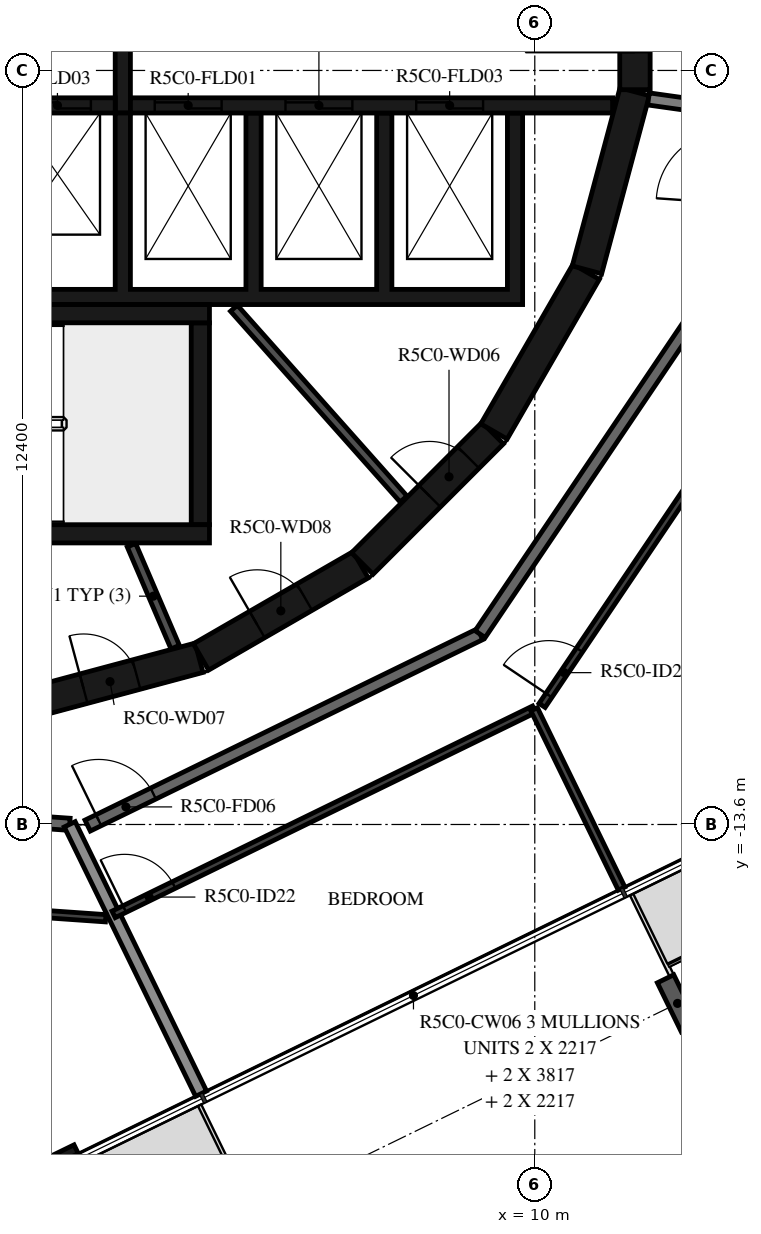
"""IFC4 building model, lengths in metres.
Left out: names, types, materials, properties, quantities, classifications, styles, units other than length and angle.
Written with IfcOpenShell. Run it as: python <this file> out.ifc"""

import sys

from ifc_helpers import new_model, si_unit, direction, frame, frame_2d, origin, origin_2d, place, context, subcontext, project, spatial, polyline, rectangle, i_section, outline, extrude, element, fill, save


model = new_model("IFC4")
c1 = context("Model", 3, precision=1e-05, world=origin(), true_north=direction((0.0, 1.0)))
c2 = subcontext(c1, "Body", "Model", "MODEL_VIEW")
j1 = project(units=[si_unit("LENGTHUNIT", "METRE"), si_unit("PLANEANGLEUNIT", "RADIAN")], contexts=[c1])
p1 = place(None, origin())
s1 = spatial("IfcSite", under=j1, at=p1, CompositionType="ELEMENT")
p2 = place(p1, origin())
s2 = spatial("IfcBuilding", under=s1, at=p2, CompositionType="ELEMENT")
p3 = place(p2, frame((0.0, 0.0, 209.4)))
s3 = spatial("IfcBuildingStorey", under=s2, at=p3, CompositionType="ELEMENT", Elevation=209.4)
p4 = place(p3, frame((12.348, -16.542, -0.38), z_axis=(0.0, 0.0, 1.0), x_axis=(-0.898794095235, -0.438371046456, 0.0)))
e1 = element("IfcColumn", 1, at=p4, inside=s3, PredefinedType="COLUMN", context=c2, shape_type="SweptSolid", body=[
    extrude(i_section(OverallWidth=0.3, OverallDepth=0.9, WebThickness=0.019, FlangeThickness=0.035, FilletRadius=0.03, at=origin_2d()), origin(), (0.0, 0.0, 1.0), 3.5),
])
p5 = place(p3, frame((-0.418, -20.343, 0.0), z_axis=(0.0, 0.0, 1.0), x_axis=(0.898778711213, 0.43840258698, 0.0)))
e2 = element("IfcWall", 2, at=p5, inside=s3, PredefinedType="STANDARD", context=c2, shape_type="SweptSolid", body=[
    extrude(rectangle(XDim=3.2, YDim=0.16, at=frame_2d((1.6, 0.0))), origin(), (0.0, 0.0, 1.0), 3.12),
])
p6 = place(p5, frame((0.4, 0.0, 0.0)))
e3 = element("IfcOpeningElement", 3, at=p6, cuts=e2, PredefinedType="OPENING", context=c2, shape_type="SweptSolid", body=[
    extrude(rectangle(XDim=2.4, YDim=2.4, at=frame_2d((1.2, 1.2))), frame((0.0, 0.09, 0.0), z_axis=(0.0, -1.0, 0.0), x_axis=(1.0, 0.0, 0.0)), (0.0, 0.0, 1.0), 0.18),
])
p7 = place(p3, frame((1.55, -11.643, 0.0), z_axis=(0.0, 0.0, 1.0), x_axis=(0.965948410781, 0.258734743916, 0.0)))
e4 = element("IfcWall", 4, at=p7, inside=s3, PredefinedType="SHEAR", context=c2, shape_type="SweptSolid", body=[
    extrude(rectangle(XDim=3.033, YDim=0.5, at=frame_2d((1.516, 0.0))), origin(), (0.0, 0.0, 1.0), 3.12),
])
p8 = place(p7, frame((1.066, 0.0, 0.0)))
e5 = element("IfcOpeningElement", 5, at=p8, cuts=e4, PredefinedType="OPENING", context=c2, shape_type="SweptSolid", body=[
    extrude(rectangle(XDim=0.9, YDim=2.1, at=frame_2d((0.45, 1.05))), frame((0.0, 0.26, 0.0), z_axis=(0.0, -1.0, 0.0), x_axis=(1.0, 0.0, 0.0)), (0.0, 0.0, 1.0), 0.52),
])
p9 = place(p3, frame((4.51, -10.845, 0.0), z_axis=(0.0, 0.0, 1.0), x_axis=(0.865975092491, 0.500087131594, 0.0)))
e6 = element("IfcWall", 6, at=p9, inside=s3, PredefinedType="SHEAR", context=c2, shape_type="SweptSolid", body=[
    extrude(rectangle(XDim=3.033, YDim=0.5, at=frame_2d((1.516, 0.0))), origin(), (0.0, 0.0, 1.0), 3.12),
])
p10 = place(p9, frame((1.066, 0.0, 0.0)))
e7 = element("IfcOpeningElement", 7, at=p10, cuts=e6, PredefinedType="OPENING", context=c2, shape_type="SweptSolid", body=[
    extrude(rectangle(XDim=0.9, YDim=2.1, at=frame_2d((0.45, 1.05))), frame((0.0, 0.26, 0.0), z_axis=(0.0, -1.0, 0.0), x_axis=(1.0, 0.0, 0.0)), (0.0, 0.0, 1.0), 0.52),
])
p11 = place(p3, frame((7.164, -9.308, 0.0), z_axis=(0.0, 0.0, 1.0), x_axis=(0.707106781187, 0.707106781187, 0.0)))
e8 = element("IfcWall", 8, at=p11, inside=s3, PredefinedType="SHEAR", context=c2, shape_type="SweptSolid", body=[
    extrude(rectangle(XDim=3.032, YDim=0.5, at=frame_2d((1.516, 0.0))), origin(), (0.0, 0.0, 1.0), 3.12),
])
p12 = place(p11, frame((1.566, 0.0, 0.0)))
e9 = element("IfcOpeningElement", 9, at=p12, cuts=e8, PredefinedType="OPENING", context=c2, shape_type="SweptSolid", body=[
    extrude(rectangle(XDim=0.9, YDim=2.1, at=frame_2d((0.45, 1.05))), frame((0.0, 0.26, 0.0), z_axis=(0.0, -1.0, 0.0), x_axis=(1.0, 0.0, 0.0)), (0.0, 0.0, 1.0), 0.52),
])
for number, where, z_axis, x_axis in (
    (10, (9.329, -7.137, 0.0), (0.0, 0.0, 1.0), (0.5, 0.866, 0.0)),
    (11, (10.858, -4.479, 0.0), (0.0, 0.0, 1.0), (0.259, 0.966, 0.0)),
):
    element("IfcWall", number, at=place(p3, frame(where, z_axis=z_axis, x_axis=x_axis)), inside=s3, PredefinedType="SHEAR", context=c2, shape_type="SweptSolid", body=[
        extrude(rectangle(XDim=3.033, YDim=0.5, at=frame_2d((1.516, 0.0))), origin(), (0.0, 0.0, 1.0), 3.12),
    ])
p13 = place(p3, frame((11.647, -1.516, 0.0), z_axis=(0.0, 0.0, 1.0), x_axis=(0.0, 1.0, 0.0)))
e12 = element("IfcWall", 12, at=p13, inside=s3, PredefinedType="SHEAR", context=c2, shape_type="SweptSolid", body=[
    extrude(rectangle(XDim=3.033, YDim=0.5, at=frame_2d((1.516, 0.0))), origin(), (0.0, 0.0, 1.0), 3.12),
])
p14 = place(p13, frame((0.616, 0.0, 0.0)))
e13 = element("IfcOpeningElement", 13, at=p14, cuts=e12, PredefinedType="OPENING", context=c2, shape_type="SweptSolid", body=[
    extrude(rectangle(XDim=1.8, YDim=2.1, at=frame_2d((0.9, 1.05))), frame((0.0, 0.26, 0.0), z_axis=(0.0, -1.0, 0.0), x_axis=(1.0, 0.0, 0.0)), (0.0, 0.0, 1.0), 0.52),
])
p15 = place(p3, frame((-2.4, -5.2, 0.0), z_axis=(0.0, 0.0, 1.0), x_axis=(1.0, 0.0, 0.0)))
e14 = element("IfcWall", 14, at=p15, inside=s3, PredefinedType="SHEAR", context=c2, shape_type="SweptSolid", body=[
    extrude(rectangle(XDim=7.05, YDim=0.3, at=frame_2d((3.525, 0.0))), origin(), (0.0, 0.0, 1.0), 3.12),
])
p16 = place(p3, frame((4.5, -8.67, 0.0), z_axis=(0.0, 0.0, 1.0), x_axis=(0.0, 1.0, 0.0)))
e15 = element("IfcWall", 15, at=p16, inside=s3, PredefinedType="SHEAR", context=c2, shape_type="SweptSolid", body=[
    extrude(rectangle(XDim=3.32, YDim=0.3, at=frame_2d((1.66, 0.0))), origin(), (0.0, 0.0, 1.0), 3.12),
])
p17 = place(p3, frame((0.1, -8.82, 0.0), z_axis=(0.0, 0.0, 1.0), x_axis=(1.0, 0.0, 0.0)))
e16 = element("IfcWall", 16, at=p17, inside=s3, PredefinedType="SHEAR", context=c2, shape_type="SweptSolid", body=[
    extrude(rectangle(XDim=4.55, YDim=0.3, at=frame_2d((2.275, 0.0))), origin(), (0.0, 0.0, 1.0), 3.12),
])
p18 = place(p3, origin())
e17 = element("IfcWall", 17, at=p18, inside=s3, PredefinedType="SHEAR", context=c2, shape_type="SweptSolid", body=[
    extrude(outline(polyline([(9.8, -5.05), (9.8, -4.8), (9.8, -1.9), (9.55, -1.9), (9.55, -4.8), (7.65, -4.8), (7.65, -1.9), (7.4, -1.9), (7.4, -4.8), (5.5, -4.8), (5.5, -1.9), (5.25, -1.9), (5.25, -4.8), (3.35, -4.8), (3.35, -1.9), (3.1, -1.9), (3.1, -4.8), (1.2, -4.8), (1.2, -1.9), (0.95, -1.9), (0.95, -4.8), (-5.25, -4.8), (-5.25, -1.9), (-5.5, -1.9), (-5.5, -4.8), (-7.4, -4.8), (-7.4, -1.9), (-7.65, -1.9), (-7.65, -4.8), (-9.55, -4.8), (-9.55, -1.9), (-9.8, -1.9), (-9.8, -4.8), (-9.8, -5.05), (9.8, -5.05)])), origin(), (0.0, 0.0, 1.0), 3.12),
])
p19 = place(p3, frame((-11.28, -1.775, 0.0), z_axis=(0.0, 0.0, 1.0), x_axis=(1.0, 0.0, 0.0)))
e18 = element("IfcWall", 18, at=p19, inside=s3, PredefinedType="SHEAR", context=c2, shape_type="SweptSolid", body=[
    extrude(rectangle(XDim=14.38, YDim=0.25, at=frame_2d((7.19, 0.0))), origin(), (0.0, 0.0, 1.0), 3.12),
])
p20 = place(p19, frame((12.88, 0.0, 0.0)))
e19 = element("IfcOpeningElement", 19, at=p20, cuts=e18, PredefinedType="OPENING", context=c2, shape_type="SweptSolid", body=[
    extrude(rectangle(XDim=1.1, YDim=2.1, at=frame_2d((0.55, 1.05))), frame((0.0, 0.135, 0.0), z_axis=(0.0, -1.0, 0.0), x_axis=(1.0, 0.0, 0.0)), (0.0, 0.0, 1.0), 0.27),
])
p21 = place(p19, frame((8.68, 0.0, 0.0)))
e20 = element("IfcOpeningElement", 20, at=p21, cuts=e18, PredefinedType="OPENING", context=c2, shape_type="SweptSolid", body=[
    extrude(rectangle(XDim=0.9, YDim=2.1, at=frame_2d((0.45, 1.05))), frame((0.0, 0.135, 0.0), z_axis=(0.0, -1.0, 0.0), x_axis=(1.0, 0.0, 0.0)), (0.0, 0.0, 1.0), 0.27),
])
p22 = place(p3, frame((3.35, -1.775, 0.0), z_axis=(0.0, 0.0, 1.0), x_axis=(1.0, 0.0, 0.0)))
e21 = element("IfcWall", 21, at=p22, inside=s3, PredefinedType="SHEAR", context=c2, shape_type="SweptSolid", body=[
    extrude(rectangle(XDim=7.93, YDim=0.25, at=frame_2d((3.965, 0.0))), origin(), (0.0, 0.0, 1.0), 3.12),
])
p23 = place(p22, frame((0.4, 0.0, 0.0)))
e22 = element("IfcOpeningElement", 22, at=p23, cuts=e21, PredefinedType="OPENING", context=c2, shape_type="SweptSolid", body=[
    extrude(rectangle(XDim=1.1, YDim=2.4, at=frame_2d((0.55, 1.2))), frame((0.0, 0.135, 0.0), z_axis=(0.0, -1.0, 0.0), x_axis=(1.0, 0.0, 0.0)), (0.0, 0.0, 1.0), 0.27),
])
p24 = place(p22, frame((2.55, 0.0, 0.0)))
e23 = element("IfcOpeningElement", 23, at=p24, cuts=e21, PredefinedType="OPENING", context=c2, shape_type="SweptSolid", body=[
    extrude(rectangle(XDim=1.1, YDim=2.4, at=frame_2d((0.55, 1.2))), frame((0.0, 0.135, 0.0), z_axis=(0.0, -1.0, 0.0), x_axis=(1.0, 0.0, 0.0)), (0.0, 0.0, 1.0), 0.27),
])
p25 = place(p22, frame((4.7, 0.0, 0.0)))
e24 = element("IfcOpeningElement", 24, at=p25, cuts=e21, PredefinedType="OPENING", context=c2, shape_type="SweptSolid", body=[
    extrude(rectangle(XDim=1.1, YDim=2.4, at=frame_2d((0.55, 1.2))), frame((0.0, 0.135, 0.0), z_axis=(0.0, -1.0, 0.0), x_axis=(1.0, 0.0, 0.0)), (0.0, 0.0, 1.0), 0.27),
])
p26 = place(p3, frame((3.225, -1.9, 0.0), z_axis=(0.0, 0.0, 1.0), x_axis=(0.0, 1.0, 0.0)))
e25 = element("IfcWall", 25, at=p26, inside=s3, PredefinedType="SHEAR", context=c2, shape_type="SweptSolid", body=[
    extrude(rectangle(XDim=3.8, YDim=0.25, at=frame_2d((1.9, 0.0))), origin(), (0.0, 0.0, 1.0), 3.12),
])
p27 = place(p3, frame((7.842, -8.248, 0.0), z_axis=(0.0, 0.0, 1.0), x_axis=(-0.66446128181, 0.747322691329, 0.0)))
e26 = element("IfcWall", 26, at=p27, inside=s3, PredefinedType="PARTITIONING", context=c2, shape_type="SweptSolid", body=[
    extrude(rectangle(XDim=4.198, YDim=0.15, at=frame_2d((2.099, 0.0))), origin(), (0.0, 0.0, 1.0), 3.12),
])
p28 = place(p3, frame((3.367, -9.007, 0.0), z_axis=(0.0, 0.0, 1.0), x_axis=(0.394387482265, -0.918944238696, 0.0)))
e27 = element("IfcWall", 27, at=p28, inside=s3, PredefinedType="PARTITIONING", context=c2, shape_type="SweptSolid", body=[
    extrude(rectangle(XDim=1.825, YDim=0.15, at=frame_2d((0.913, 0.0))), origin(), (0.0, 0.0, 1.0), 3.12),
])
p29 = place(p3, frame((13.302, -1.869, 0.0), z_axis=(0.0, 0.0, 1.0), x_axis=(-0.990274397042, 0.13912806533, 0.0)))
e28 = element("IfcWall", 28, at=p29, inside=s3, PredefinedType="STANDARD", context=c2, shape_type="SweptSolid", body=[
    extrude(rectangle(XDim=1.446, YDim=0.2, at=frame_2d((0.723, 0.0))), origin(), (0.0, 0.0, 1.0), 3.12),
])
p30 = place(p3, frame((-4.517, -13.117, 0.0), z_axis=(0.0, 0.0, 1.0), x_axis=(0.997564669554, -0.069747616856, 0.0)))
e29 = element("IfcWall", 29, at=p30, inside=s3, PredefinedType="STANDARD", context=c2, shape_type="SweptSolid", body=[
    extrude(rectangle(XDim=6.885, YDim=0.2, at=frame_2d((3.443, 0.0))), origin(), (0.0, 0.0, 1.0), 3.12),
])
p31 = place(p30, frame((3.2, 0.0, 0.0)))
e30 = element("IfcOpeningElement", 30, at=p31, cuts=e29, PredefinedType="OPENING", context=c2, shape_type="SweptSolid", body=[
    extrude(rectangle(XDim=1.0, YDim=2.1, at=frame_2d((0.5, 1.05))), frame((0.0, 0.11, 0.0), z_axis=(0.0, -1.0, 0.0), x_axis=(1.0, 0.0, 0.0)), (0.0, 0.0, 1.0), 0.22),
])
p32 = place(p3, frame((2.647, -13.618, 0.0), z_axis=(0.0, 0.0, 1.0), x_axis=(0.898796543751, 0.438366026218, 0.0)))
e31 = element("IfcWall", 31, at=p32, inside=s3, PredefinedType="STANDARD", context=c2, shape_type="SweptSolid", body=[
    extrude(rectangle(XDim=7.181, YDim=0.2, at=frame_2d((3.591, 0.0))), origin(), (0.0, 0.0, 1.0), 3.12),
])
p33 = place(p32, frame((0.2, 0.0, 0.0)))
e32 = element("IfcOpeningElement", 32, at=p33, cuts=e31, PredefinedType="OPENING", context=c2, shape_type="SweptSolid", body=[
    extrude(rectangle(XDim=1.0, YDim=2.1, at=frame_2d((0.5, 1.05))), frame((0.0, 0.11, 0.0), z_axis=(0.0, -1.0, 0.0), x_axis=(1.0, 0.0, 0.0)), (0.0, 0.0, 1.0), 0.22),
])
p34 = place(p3, frame((9.101, -10.47, 0.0), z_axis=(0.0, 0.0, 1.0), x_axis=(0.559195469534, 0.829035841718, 0.0)))
e33 = element("IfcWall", 33, at=p34, inside=s3, PredefinedType="STANDARD", context=c2, shape_type="SweptSolid", body=[
    extrude(rectangle(XDim=7.181, YDim=0.2, at=frame_2d((3.591, 0.0))), origin(), (0.0, 0.0, 1.0), 3.12),
])
p35 = place(p3, frame((4.512, -18.027, 0.0), z_axis=(0.0, 0.0, 1.0), x_axis=(-0.438374835386, 0.898792247241, 0.0)))
e34 = element("IfcWall", 34, at=p35, inside=s3, PredefinedType="STANDARD", context=c2, shape_type="SweptSolid", body=[
    extrude(rectangle(XDim=4.929, YDim=0.2, at=frame_2d((2.464, 0.0))), origin(), (0.0, 0.0, 1.0), 2.73),
])
p36 = place(p3, frame((-4.309, -14.635, 0.0), z_axis=(0.0, 0.0, 1.0), x_axis=(0.997564788147, -0.069745920658, 0.0)))
e35 = element("IfcWall", 35, at=p36, inside=s3, PredefinedType="PARTITIONING", context=c2, shape_type="SweptSolid", body=[
    extrude(rectangle(XDim=7.271, YDim=0.12, at=frame_2d((3.635, 0.0))), origin(), (0.0, 0.0, 1.0), 3.12),
])
p37 = place(p36, frame((3.632, 0.0, 0.0)))
e36 = element("IfcOpeningElement", 36, at=p37, cuts=e35, PredefinedType="OPENING", context=c2, shape_type="SweptSolid", body=[
    extrude(rectangle(XDim=0.9, YDim=2.1, at=frame_2d((0.45, 1.05))), frame((0.0, 0.07, 0.0), z_axis=(0.0, -1.0, 0.0), x_axis=(1.0, 0.0, 0.0)), (0.0, 0.0, 1.0), 0.14),
])
p38 = place(p3, frame((3.074, -15.078, 0.0), z_axis=(0.0, 0.0, 1.0), x_axis=(0.898800770739, 0.438357359377, 0.0)))
e37 = element("IfcWall", 37, at=p38, inside=s3, PredefinedType="PARTITIONING", context=c2, shape_type="SweptSolid", body=[
    extrude(rectangle(XDim=7.694, YDim=0.12, at=frame_2d((3.847, 0.0))), origin(), (0.0, 0.0, 1.0), 3.12),
])
p39 = place(p38, frame((0.2, 0.0, 0.0)))
e38 = element("IfcOpeningElement", 38, at=p39, cuts=e37, PredefinedType="OPENING", context=c2, shape_type="SweptSolid", body=[
    extrude(rectangle(XDim=0.9, YDim=2.1, at=frame_2d((0.45, 1.05))), frame((0.0, 0.07, 0.0), z_axis=(0.0, -1.0, 0.0), x_axis=(1.0, 0.0, 0.0)), (0.0, 0.0, 1.0), 0.14),
])
p40 = place(p3, frame((10.12, -11.642, 0.0), z_axis=(0.0, 0.0, 1.0), x_axis=(0.559201404667, 0.829031838362, 0.0)))
e39 = element("IfcWall", 39, at=p40, inside=s3, PredefinedType="PARTITIONING", context=c2, shape_type="SweptSolid", body=[
    extrude(rectangle(XDim=7.709, YDim=0.12, at=frame_2d((3.854, 0.0))), origin(), (0.0, 0.0, 1.0), 3.12),
])
p41 = place(p40, frame((0.2, 0.0, 0.0)))
e40 = element("IfcOpeningElement", 40, at=p41, cuts=e39, PredefinedType="OPENING", context=c2, shape_type="SweptSolid", body=[
    extrude(rectangle(XDim=0.9, YDim=2.1, at=frame_2d((0.45, 1.05))), frame((0.0, 0.07, 0.0), z_axis=(0.0, -1.0, 0.0), x_axis=(1.0, 0.0, 0.0)), (0.0, 0.0, 1.0), 0.14),
])
p42 = place(p3, frame((11.427, -14.654, 0.0), z_axis=(0.0, 0.0, 1.0), x_axis=(-0.438410435857, 0.898774882677, 0.0)))
e41 = element("IfcWall", 41, at=p42, inside=s3, PredefinedType="PARTITIONING", context=c2, shape_type="SweptSolid", body=[
    extrude(rectangle(XDim=3.281, YDim=0.12, at=frame_2d((1.64, 0.0))), origin(), (0.0, 0.0, 1.0), 2.73),
])
p43 = place(p14, origin())
e42 = element("IfcDoor", 42, at=p43, inside=s3, OperationType="DOUBLE_DOOR_SINGLE_SWING", PredefinedType="DOOR", context=c2, shape_type="SweptSolid", body=[
    extrude(rectangle(XDim=1.8, YDim=2.1, at=frame_2d((0.9, 1.05))), frame((0.0, 0.025, 0.0), z_axis=(0.0, -1.0, 0.0), x_axis=(1.0, 0.0, 0.0)), (0.0, 0.0, 1.0), 0.05),
])
fill(e13, e42)
p44 = place(p20, origin())
e43 = element("IfcDoor", 43, at=p44, inside=s3, OperationType="DOUBLE_DOOR_SLIDING", PredefinedType="DOOR", context=c2, shape_type="SweptSolid", body=[
    extrude(rectangle(XDim=1.1, YDim=2.1, at=frame_2d((0.55, 1.05))), frame((0.0, 0.025, 0.0), z_axis=(0.0, -1.0, 0.0), x_axis=(1.0, 0.0, 0.0)), (0.0, 0.0, 1.0), 0.05),
])
fill(e19, e43)
p45 = place(p23, origin())
e44 = element("IfcDoor", 44, at=p45, inside=s3, OperationType="DOUBLE_DOOR_SLIDING", PredefinedType="DOOR", context=c2, shape_type="SweptSolid", body=[
    extrude(rectangle(XDim=1.1, YDim=2.4, at=frame_2d((0.55, 1.2))), frame((0.0, 0.025, 0.0), z_axis=(0.0, -1.0, 0.0), x_axis=(1.0, 0.0, 0.0)), (0.0, 0.0, 1.0), 0.05),
])
fill(e22, e44)
p46 = place(p24, origin())
e45 = element("IfcDoor", 45, at=p46, inside=s3, OperationType="DOUBLE_DOOR_SLIDING", PredefinedType="DOOR", context=c2, shape_type="SweptSolid", body=[
    extrude(rectangle(XDim=1.1, YDim=2.4, at=frame_2d((0.55, 1.2))), frame((0.0, 0.025, 0.0), z_axis=(0.0, -1.0, 0.0), x_axis=(1.0, 0.0, 0.0)), (0.0, 0.0, 1.0), 0.05),
])
fill(e23, e45)
p47 = place(p25, origin())
e46 = element("IfcDoor", 46, at=p47, inside=s3, OperationType="DOUBLE_DOOR_SLIDING", PredefinedType="DOOR", context=c2, shape_type="SweptSolid", body=[
    extrude(rectangle(XDim=1.1, YDim=2.4, at=frame_2d((0.55, 1.2))), frame((0.0, 0.025, 0.0), z_axis=(0.0, -1.0, 0.0), x_axis=(1.0, 0.0, 0.0)), (0.0, 0.0, 1.0), 0.05),
])
fill(e24, e46)
p48 = place(p12, origin())
e47 = element("IfcDoor", 47, at=p48, inside=s3, OperationType="SINGLE_SWING_RIGHT", PredefinedType="DOOR", context=c2, shape_type="SweptSolid", body=[
    extrude(rectangle(XDim=0.9, YDim=2.1, at=frame_2d((0.45, 1.05))), frame((0.0, 0.025, 0.0), z_axis=(0.0, -1.0, 0.0), x_axis=(1.0, 0.0, 0.0)), (0.0, 0.0, 1.0), 0.05),
])
fill(e9, e47)
p49 = place(p8, origin())
e48 = element("IfcDoor", 48, at=p49, inside=s3, OperationType="SINGLE_SWING_LEFT", PredefinedType="DOOR", context=c2, shape_type="SweptSolid", body=[
    extrude(rectangle(XDim=0.9, YDim=2.1, at=frame_2d((0.45, 1.05))), frame((0.0, 0.025, 0.0), z_axis=(0.0, -1.0, 0.0), x_axis=(1.0, 0.0, 0.0)), (0.0, 0.0, 1.0), 0.05),
])
fill(e5, e48)
p50 = place(p10, origin())
e49 = element("IfcDoor", 49, at=p50, inside=s3, OperationType="SINGLE_SWING_RIGHT", PredefinedType="DOOR", context=c2, shape_type="SweptSolid", body=[
    extrude(rectangle(XDim=0.9, YDim=2.1, at=frame_2d((0.45, 1.05))), frame((0.0, 0.025, 0.0), z_axis=(0.0, -1.0, 0.0), x_axis=(1.0, 0.0, 0.0)), (0.0, 0.0, 1.0), 0.05),
])
fill(e7, e49)
p51 = place(p33, origin())
e50 = element("IfcDoor", 50, at=p51, inside=s3, OperationType="SINGLE_SWING_LEFT", PredefinedType="DOOR", context=c2, shape_type="SweptSolid", body=[
    extrude(rectangle(XDim=1.0, YDim=2.1, at=frame_2d((0.5, 1.05))), frame((0.0, 0.025, 0.0), z_axis=(0.0, -1.0, 0.0), x_axis=(1.0, 0.0, 0.0)), (0.0, 0.0, 1.0), 0.05),
])
fill(e32, e50)
p52 = place(p39, origin())
e51 = element("IfcDoor", 51, at=p52, inside=s3, OperationType="SINGLE_SWING_LEFT", PredefinedType="DOOR", context=c2, shape_type="SweptSolid", body=[
    extrude(rectangle(XDim=0.9, YDim=2.1, at=frame_2d((0.45, 1.05))), frame((0.0, 0.025, 0.0), z_axis=(0.0, -1.0, 0.0), x_axis=(1.0, 0.0, 0.0)), (0.0, 0.0, 1.0), 0.05),
])
fill(e38, e51)
p53 = place(p41, origin())
e52 = element("IfcDoor", 52, at=p53, inside=s3, OperationType="SINGLE_SWING_RIGHT", PredefinedType="DOOR", context=c2, shape_type="SweptSolid", body=[
    extrude(rectangle(XDim=0.9, YDim=2.1, at=frame_2d((0.45, 1.05))), frame((0.0, 0.025, 0.0), z_axis=(0.0, -1.0, 0.0), x_axis=(1.0, 0.0, 0.0)), (0.0, 0.0, 1.0), 0.05),
])
fill(e40, e52)
save(model, sys.argv[1])
